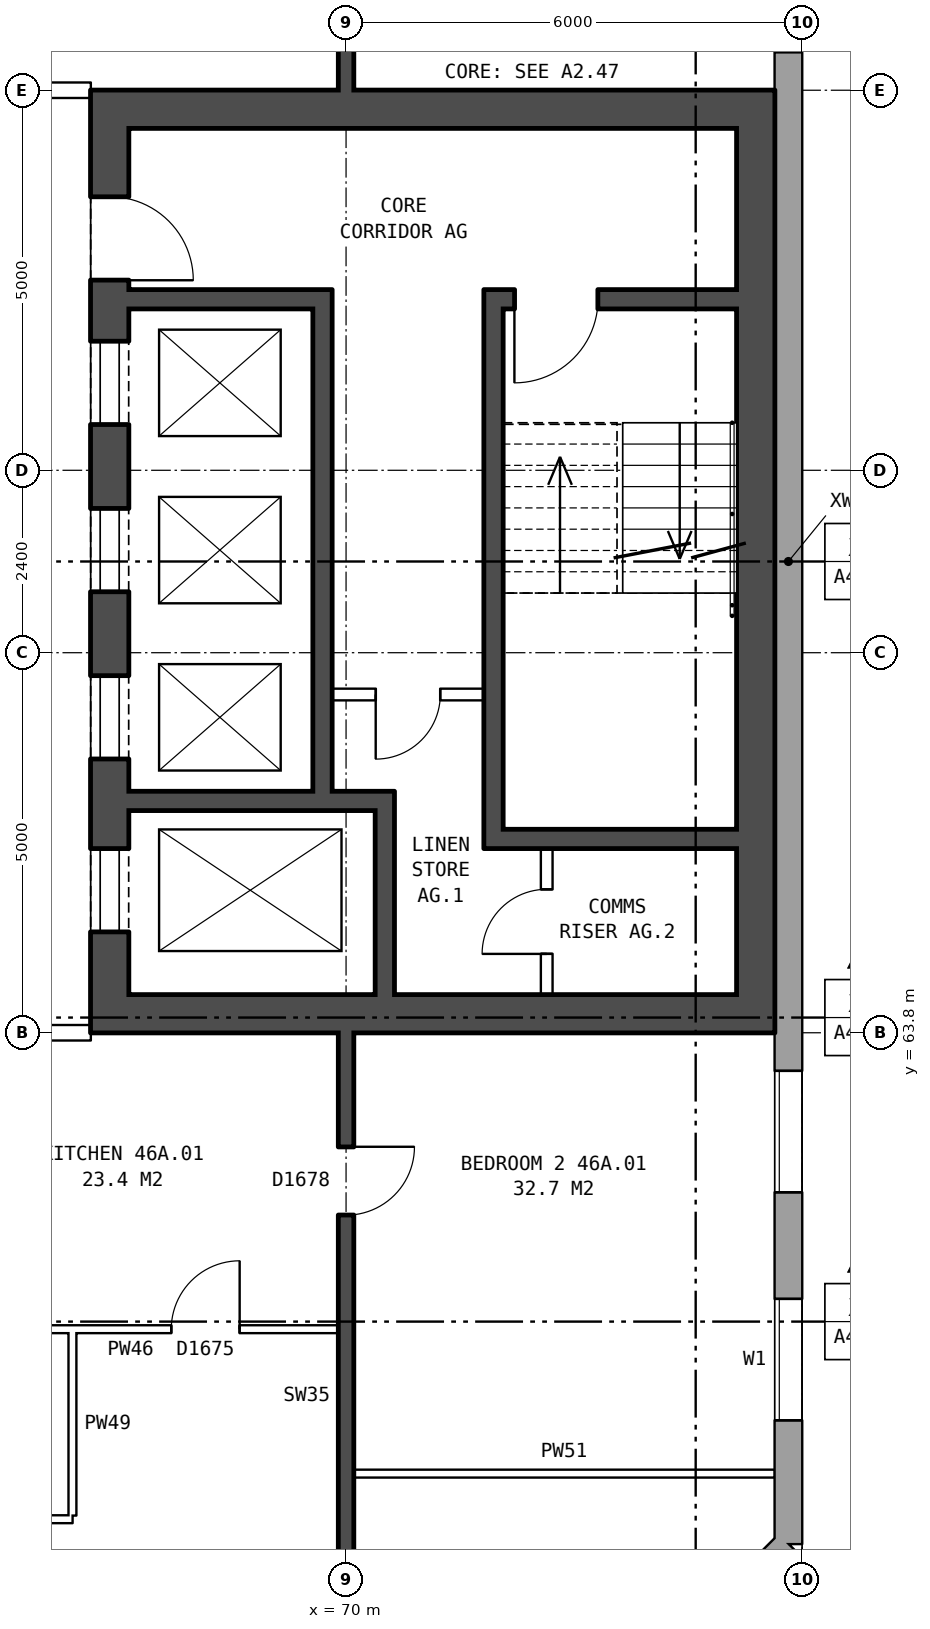
"""IFC4 building model, lengths in metres.
Left out: names, types, materials, properties, quantities, classifications, styles, units other than length and angle.
Written with IfcOpenShell. Run it as: python <this file> out.ifc"""

import sys

from ifc_helpers import new_model, si_unit, direction, frame, frame_2d, origin, place, context, subcontext, project, spatial, rectangle, extrude, element, fill, save


model = new_model("IFC4")
c1 = context("Model", 3, precision=1e-05, world=origin(), true_north=direction((0.0, 1.0)))
c2 = subcontext(c1, "Body", "Model", "MODEL_VIEW")
j1 = project(units=[si_unit("LENGTHUNIT", "METRE"), si_unit("PLANEANGLEUNIT", "RADIAN")], contexts=[c1])
p1 = place(None, origin())
s1 = spatial("IfcSite", under=j1, at=p1, CompositionType="ELEMENT")
p2 = place(p1, origin())
s2 = spatial("IfcBuilding", under=s1, at=p2, CompositionType="ELEMENT")
p3 = place(p2, frame((0.0, 0.0, 164.0)))
s3 = spatial("IfcBuildingStorey", under=s2, at=p3, CompositionType="ELEMENT", Elevation=164.0)
p4 = place(p3, frame((72.925, 54.18, 0.0), z_axis=(0.0, 0.0, 1.0), x_axis=(0.707106781187, 0.707106781187, 0.0)))
e1 = element("IfcWall", 1, at=p4, inside=s3, PredefinedType="STANDARD", context=c2, shape_type="SweptSolid", body=[
    extrude(rectangle(XDim=4.094, YDim=0.36, at=frame_2d((2.047, 0.0))), origin(), (0.0, 0.0, 1.0), 2.85),
])
p5 = place(p4, frame((1.247, 0.0, 0.8)))
e2 = element("IfcOpeningElement", 2, at=p5, cuts=e1, PredefinedType="OPENING", context=c2, shape_type="SweptSolid", body=[
    extrude(rectangle(XDim=1.6, YDim=1.8, at=frame_2d((0.8, 0.9))), frame((0.0, 0.19, 0.0), z_axis=(0.0, -1.0, 0.0), x_axis=(1.0, 0.0, 0.0)), (0.0, 0.0, 1.0), 0.38),
])
p6 = place(p3, frame((75.82, 57.075, 0.0), z_axis=(0.0, 0.0, 1.0), x_axis=(0.0, 1.0, 0.0)))
e3 = element("IfcWall", 3, at=p6, inside=s3, PredefinedType="STANDARD", context=c2, shape_type="SweptSolid", body=[
    extrude(rectangle(XDim=25.851, YDim=0.36, at=frame_2d((12.925, 0.0))), origin(), (0.0, 0.0, 1.0), 2.85),
])
p7 = place(p6, frame((1.625, 0.0, 0.8)))
e4 = element("IfcOpeningElement", 4, at=p7, cuts=e3, PredefinedType="OPENING", context=c2, shape_type="SweptSolid", body=[
    extrude(rectangle(XDim=1.6, YDim=1.8, at=frame_2d((0.8, 0.9))), frame((0.0, 0.19, 0.0), z_axis=(0.0, -1.0, 0.0), x_axis=(1.0, 0.0, 0.0)), (0.0, 0.0, 1.0), 0.38),
])
p8 = place(p6, frame((4.625, 0.0, 0.8)))
e5 = element("IfcOpeningElement", 5, at=p8, cuts=e3, PredefinedType="OPENING", context=c2, shape_type="SweptSolid", body=[
    extrude(rectangle(XDim=1.6, YDim=1.8, at=frame_2d((0.8, 0.9))), frame((0.0, 0.19, 0.0), z_axis=(0.0, -1.0, 0.0), x_axis=(1.0, 0.0, 0.0)), (0.0, 0.0, 1.0), 0.38),
])
p9 = place(p6, frame((19.625, 0.0, 0.8)))
e6 = element("IfcOpeningElement", 6, at=p9, cuts=e3, PredefinedType="OPENING", context=c2, shape_type="SweptSolid", body=[
    extrude(rectangle(XDim=1.6, YDim=1.8, at=frame_2d((0.8, 0.9))), frame((0.0, 0.19, 0.0), z_axis=(0.0, -1.0, 0.0), x_axis=(1.0, 0.0, 0.0)), (0.0, 0.0, 1.0), 0.38),
])
p10 = place(p6, frame((22.625, 0.0, 0.8)))
e7 = element("IfcOpeningElement", 7, at=p10, cuts=e3, PredefinedType="OPENING", context=c2, shape_type="SweptSolid", body=[
    extrude(rectangle(XDim=1.6, YDim=1.8, at=frame_2d((0.8, 0.9))), frame((0.0, 0.19, 0.0), z_axis=(0.0, -1.0, 0.0), x_axis=(1.0, 0.0, 0.0)), (0.0, 0.0, 1.0), 0.38),
])
p11 = place(p3, frame((66.89, 63.8, 0.0), z_axis=(0.0, 0.0, 1.0), x_axis=(0.0, 1.0, 0.0)))
e8 = element("IfcWall", 8, at=p11, inside=s3, PredefinedType="SHEAR", context=c2, shape_type="SweptSolid", body=[
    extrude(rectangle(XDim=12.4, YDim=0.5, at=frame_2d((6.2, 0.0))), origin(), (0.0, 0.0, 1.0), 2.85),
])
p12 = place(p11, frame((1.325, 0.0, 0.0)))
e9 = element("IfcOpeningElement", 9, at=p12, cuts=e8, PredefinedType="OPENING", context=c2, shape_type="SweptSolid", body=[
    extrude(rectangle(XDim=1.1, YDim=2.1, at=frame_2d((0.55, 1.05))), frame((0.0, 0.26, 0.0), z_axis=(0.0, -1.0, 0.0), x_axis=(1.0, 0.0, 0.0)), (0.0, 0.0, 1.0), 0.52),
])
p13 = place(p11, frame((3.6, 0.0, 0.0)))
e10 = element("IfcOpeningElement", 10, at=p13, cuts=e8, PredefinedType="OPENING", context=c2, shape_type="SweptSolid", body=[
    extrude(rectangle(XDim=1.1, YDim=2.1, at=frame_2d((0.55, 1.05))), frame((0.0, 0.26, 0.0), z_axis=(0.0, -1.0, 0.0), x_axis=(1.0, 0.0, 0.0)), (0.0, 0.0, 1.0), 0.52),
])
p14 = place(p11, frame((5.8, 0.0, 0.0)))
e11 = element("IfcOpeningElement", 11, at=p14, cuts=e8, PredefinedType="OPENING", context=c2, shape_type="SweptSolid", body=[
    extrude(rectangle(XDim=1.1, YDim=2.1, at=frame_2d((0.55, 1.05))), frame((0.0, 0.26, 0.0), z_axis=(0.0, -1.0, 0.0), x_axis=(1.0, 0.0, 0.0)), (0.0, 0.0, 1.0), 0.52),
])
p15 = place(p11, frame((8.0, 0.0, 0.0)))
e12 = element("IfcOpeningElement", 12, at=p15, cuts=e8, PredefinedType="OPENING", context=c2, shape_type="SweptSolid", body=[
    extrude(rectangle(XDim=1.1, YDim=2.1, at=frame_2d((0.55, 1.05))), frame((0.0, 0.26, 0.0), z_axis=(0.0, -1.0, 0.0), x_axis=(1.0, 0.0, 0.0)), (0.0, 0.0, 1.0), 0.52),
])
p16 = place(p11, frame((9.9, 0.0, 0.0)))
e13 = element("IfcOpeningElement", 13, at=p16, cuts=e8, PredefinedType="OPENING", context=c2, shape_type="SweptSolid", body=[
    extrude(rectangle(XDim=1.1, YDim=2.1, at=frame_2d((0.55, 1.05))), frame((0.0, 0.26, 0.0), z_axis=(0.0, -1.0, 0.0), x_axis=(1.0, 0.0, 0.0)), (0.0, 0.0, 1.0), 0.52),
])
p17 = place(p3, frame((75.39, 63.8, 0.0), z_axis=(0.0, 0.0, 1.0), x_axis=(0.0, 1.0, 0.0)))
e14 = element("IfcWall", 14, at=p17, inside=s3, PredefinedType="SHEAR", context=c2, shape_type="SweptSolid", body=[
    extrude(rectangle(XDim=12.4, YDim=0.5, at=frame_2d((6.2, 0.0))), origin(), (0.0, 0.0, 1.0), 2.85),
])
for number, where, z_axis, x_axis in (
    (15, (67.14, 64.05, 0.0), (0.0, 0.0, 1.0), (1.0, 0.0, 0.0)),
    (16, (67.14, 75.95, 0.0), (0.0, 0.0, 1.0), (1.0, 0.0, 0.0)),
):
    element("IfcWall", number, at=place(p3, frame(where, z_axis=z_axis, x_axis=x_axis)), inside=s3, PredefinedType="SHEAR", context=c2, shape_type="SweptSolid", body=[
        extrude(rectangle(XDim=8.0, YDim=0.5, at=frame_2d((4.0, 0.0))), origin(), (0.0, 0.0, 1.0), 2.85),
    ])
p18 = place(p3, frame((72.065, 66.35, 0.0), z_axis=(0.0, 0.0, 1.0), x_axis=(1.0, 0.0, 0.0)))
e17 = element("IfcWall", 17, at=p18, inside=s3, PredefinedType="SHEAR", context=c2, shape_type="SweptSolid", body=[
    extrude(rectangle(XDim=3.075, YDim=0.25, at=frame_2d((1.538, 0.0))), origin(), (0.0, 0.0, 1.0), 2.85),
])
p19 = place(p3, frame((67.14, 66.85, 0.0), z_axis=(0.0, 0.0, 1.0), x_axis=(1.0, 0.0, 0.0)))
e18 = element("IfcWall", 18, at=p19, inside=s3, PredefinedType="SHEAR", context=c2, shape_type="SweptSolid", body=[
    extrude(rectangle(XDim=3.495, YDim=0.25, at=frame_2d((1.748, 0.0))), origin(), (0.0, 0.0, 1.0), 2.85),
])
p20 = place(p3, frame((69.815, 68.25, 0.0), z_axis=(0.0, 0.0, 1.0), x_axis=(1.0, 0.0, 0.0)))
e19 = element("IfcWall", 19, at=p20, inside=s3, PredefinedType="PARTITIONING", context=c2, shape_type="SweptSolid", body=[
    extrude(rectangle(XDim=2.0, YDim=0.15, at=frame_2d((1.0, 0.0))), origin(), (0.0, 0.0, 1.0), 2.85),
])
p21 = place(p20, frame((0.575, 0.0, 0.0)))
e20 = element("IfcOpeningElement", 20, at=p21, cuts=e19, PredefinedType="OPENING", context=c2, shape_type="SweptSolid", body=[
    extrude(rectangle(XDim=0.85, YDim=2.1, at=frame_2d((0.425, 1.05))), frame((0.0, 0.085, 0.0), z_axis=(0.0, -1.0, 0.0), x_axis=(1.0, 0.0, 0.0)), (0.0, 0.0, 1.0), 0.17),
])
p22 = place(p3, frame((67.14, 73.45, 0.0), z_axis=(0.0, 0.0, 1.0), x_axis=(1.0, 0.0, 0.0)))
e21 = element("IfcWall", 21, at=p22, inside=s3, PredefinedType="SHEAR", context=c2, shape_type="SweptSolid", body=[
    extrude(rectangle(XDim=2.425, YDim=0.25, at=frame_2d((1.212, 0.0))), origin(), (0.0, 0.0, 1.0), 2.85),
])
p23 = place(p3, frame((72.065, 73.45, 0.0), z_axis=(0.0, 0.0, 1.0), x_axis=(1.0, 0.0, 0.0)))
e22 = element("IfcWall", 22, at=p23, inside=s3, PredefinedType="SHEAR", context=c2, shape_type="SweptSolid", body=[
    extrude(rectangle(XDim=3.075, YDim=0.25, at=frame_2d((1.538, 0.0))), origin(), (0.0, 0.0, 1.0), 2.85),
])
p24 = place(p23, frame((0.15, 0.0, 0.0)))
e23 = element("IfcOpeningElement", 23, at=p24, cuts=e22, PredefinedType="OPENING", context=c2, shape_type="SweptSolid", body=[
    extrude(rectangle(XDim=1.1, YDim=2.1, at=frame_2d((0.55, 1.05))), frame((0.0, 0.135, 0.0), z_axis=(0.0, -1.0, 0.0), x_axis=(1.0, 0.0, 0.0)), (0.0, 0.0, 1.0), 0.27),
])
p25 = place(p3, frame((69.69, 66.975, 0.0), z_axis=(0.0, 0.0, 1.0), x_axis=(0.0, 1.0, 0.0)))
e24 = element("IfcWall", 24, at=p25, inside=s3, PredefinedType="SHEAR", context=c2, shape_type="SweptSolid", body=[
    extrude(rectangle(XDim=6.6, YDim=0.25, at=frame_2d((3.3, 0.0))), origin(), (0.0, 0.0, 1.0), 2.85),
])
p26 = place(p3, frame((70.51, 64.3, 0.0), z_axis=(0.0, 0.0, 1.0), x_axis=(0.0, 1.0, 0.0)))
e25 = element("IfcWall", 25, at=p26, inside=s3, PredefinedType="SHEAR", context=c2, shape_type="SweptSolid", body=[
    extrude(rectangle(XDim=2.425, YDim=0.25, at=frame_2d((1.212, 0.0))), origin(), (0.0, 0.0, 1.0), 2.85),
])
p27 = place(p3, frame((71.94, 66.225, 0.0), z_axis=(0.0, 0.0, 1.0), x_axis=(0.0, 1.0, 0.0)))
e26 = element("IfcWall", 26, at=p27, inside=s3, PredefinedType="SHEAR", context=c2, shape_type="SweptSolid", body=[
    extrude(rectangle(XDim=7.35, YDim=0.25, at=frame_2d((3.675, 0.0))), origin(), (0.0, 0.0, 1.0), 2.85),
])
p28 = place(p3, frame((72.64, 64.3, 0.0), z_axis=(0.0, 0.0, 1.0), x_axis=(0.0, 1.0, 0.0)))
e27 = element("IfcWall", 27, at=p28, inside=s3, PredefinedType="PARTITIONING", context=c2, shape_type="SweptSolid", body=[
    extrude(rectangle(XDim=1.925, YDim=0.15, at=frame_2d((0.962, 0.0))), origin(), (0.0, 0.0, 1.0), 2.85),
])
p29 = place(p28, frame((0.538, 0.0, 0.0)))
e28 = element("IfcOpeningElement", 28, at=p29, cuts=e27, PredefinedType="OPENING", context=c2, shape_type="SweptSolid", body=[
    extrude(rectangle(XDim=0.85, YDim=2.1, at=frame_2d((0.425, 1.05))), frame((0.0, 0.085, 0.0), z_axis=(0.0, -1.0, 0.0), x_axis=(1.0, 0.0, 0.0)), (0.0, 0.0, 1.0), 0.17),
])
p30 = place(p3, frame((64.1, 57.4, 0.0), z_axis=(0.0, 0.0, 1.0), x_axis=(1.0, 0.0, 0.0)))
e29 = element("IfcWall", 29, at=p30, inside=s3, PredefinedType="PARTITIONING", context=c2, shape_type="SweptSolid", body=[
    extrude(rectangle(XDim=2.3, YDim=0.1, at=frame_2d((1.15, 0.0))), origin(), (0.0, 0.0, 1.0), 2.85),
])
p31 = place(p3, frame((70.1, 58.0, 0.0), z_axis=(0.0, 0.0, 1.0), x_axis=(1.0, 0.0, 0.0)))
e30 = element("IfcWall", 30, at=p31, inside=s3, PredefinedType="PARTITIONING", context=c2, shape_type="SweptSolid", body=[
    extrude(rectangle(XDim=5.54, YDim=0.1, at=frame_2d((2.77, 0.0))), origin(), (0.0, 0.0, 1.0), 2.85),
])
p32 = place(p3, frame((64.1, 59.9, 0.0), z_axis=(0.0, 0.0, 1.0), x_axis=(1.0, 0.0, 0.0)))
e31 = element("IfcWall", 31, at=p32, inside=s3, PredefinedType="PARTITIONING", context=c2, shape_type="SweptSolid", body=[
    extrude(rectangle(XDim=5.8, YDim=0.1, at=frame_2d((2.9, 0.0))), origin(), (0.0, 0.0, 1.0), 2.85),
])
p33 = place(p32, frame((3.6, 0.0, 0.0)))
e32 = element("IfcOpeningElement", 32, at=p33, cuts=e31, PredefinedType="OPENING", context=c2, shape_type="SweptSolid", body=[
    extrude(rectangle(XDim=0.9, YDim=2.1, at=frame_2d((0.45, 1.05))), frame((0.0, 0.06, 0.0), z_axis=(0.0, -1.0, 0.0), x_axis=(1.0, 0.0, 0.0)), (0.0, 0.0, 1.0), 0.12),
])
p34 = place(p32, frame((0.7, 0.0, 0.0)))
e33 = element("IfcOpeningElement", 33, at=p34, cuts=e31, PredefinedType="OPENING", context=c2, shape_type="SweptSolid", body=[
    extrude(rectangle(XDim=0.9, YDim=2.1, at=frame_2d((0.45, 1.05))), frame((0.0, 0.06, 0.0), z_axis=(0.0, -1.0, 0.0), x_axis=(1.0, 0.0, 0.0)), (0.0, 0.0, 1.0), 0.12),
])
p35 = place(p3, frame((63.64, 63.8, 0.0), z_axis=(0.0, 0.0, 1.0), x_axis=(1.0, 0.0, 0.0)))
e34 = element("IfcWall", 34, at=p35, inside=s3, PredefinedType="PARTITIONING", context=c2, shape_type="SweptSolid", body=[
    extrude(rectangle(XDim=3.0, YDim=0.2, at=frame_2d((1.5, 0.0))), origin(), (0.0, 0.0, 1.0), 2.85),
])
p36 = place(p35, frame((1.18, 0.0, 0.0)))
e35 = element("IfcOpeningElement", 35, at=p36, cuts=e34, PredefinedType="OPENING", context=c2, shape_type="SweptSolid", body=[
    extrude(rectangle(XDim=1.0, YDim=2.1, at=frame_2d((0.5, 1.05))), frame((0.0, 0.11, 0.0), z_axis=(0.0, -1.0, 0.0), x_axis=(1.0, 0.0, 0.0)), (0.0, 0.0, 1.0), 0.22),
])
p37 = place(p3, frame((63.64, 76.2, 0.0), z_axis=(0.0, 0.0, 1.0), x_axis=(1.0, 0.0, 0.0)))
e36 = element("IfcWall", 36, at=p37, inside=s3, PredefinedType="PARTITIONING", context=c2, shape_type="SweptSolid", body=[
    extrude(rectangle(XDim=3.0, YDim=0.2, at=frame_2d((1.5, 0.0))), origin(), (0.0, 0.0, 1.0), 2.85),
])
p38 = place(p37, frame((1.18, 0.0, 0.0)))
e37 = element("IfcOpeningElement", 37, at=p38, cuts=e36, PredefinedType="OPENING", context=c2, shape_type="SweptSolid", body=[
    extrude(rectangle(XDim=1.0, YDim=2.1, at=frame_2d((0.5, 1.05))), frame((0.0, 0.11, 0.0), z_axis=(0.0, -1.0, 0.0), x_axis=(1.0, 0.0, 0.0)), (0.0, 0.0, 1.0), 0.22),
])
p39 = place(p3, frame((66.4, 57.45, 0.0), z_axis=(0.0, 0.0, 1.0), x_axis=(0.0, 1.0, 0.0)))
e38 = element("IfcWall", 38, at=p39, inside=s3, PredefinedType="PARTITIONING", context=c2, shape_type="SweptSolid", body=[
    extrude(rectangle(XDim=2.4, YDim=0.1, at=frame_2d((1.2, 0.0))), origin(), (0.0, 0.0, 1.0), 2.85),
])
p40 = place(p3, frame((70.0, 54.36, 0.0), z_axis=(0.0, 0.0, 1.0), x_axis=(0.0, 1.0, 0.0)))
e39 = element("IfcWall", 39, at=p40, inside=s3, PredefinedType="SOLIDWALL", context=c2, shape_type="SweptSolid", body=[
    extrude(rectangle(XDim=9.44, YDim=0.2, at=frame_2d((4.72, 0.0))), origin(), (0.0, 0.0, 1.0), 2.85),
])
p41 = place(p40, frame((1.37, 0.0, 0.0)))
e40 = element("IfcOpeningElement", 40, at=p41, cuts=e39, PredefinedType="OPENING", context=c2, shape_type="SweptSolid", body=[
    extrude(rectangle(XDim=0.9, YDim=2.1, at=frame_2d((0.45, 1.05))), frame((0.0, 0.11, 0.0), z_axis=(0.0, -1.0, 0.0), x_axis=(1.0, 0.0, 0.0)), (0.0, 0.0, 1.0), 0.22),
])
p42 = place(p40, frame((7.04, 0.0, 0.0)))
e41 = element("IfcOpeningElement", 41, at=p42, cuts=e39, PredefinedType="OPENING", context=c2, shape_type="SweptSolid", body=[
    extrude(rectangle(XDim=0.9, YDim=2.1, at=frame_2d((0.45, 1.05))), frame((0.0, 0.11, 0.0), z_axis=(0.0, -1.0, 0.0), x_axis=(1.0, 0.0, 0.0)), (0.0, 0.0, 1.0), 0.22),
])
p43 = place(p3, frame((70.0, 76.2, 0.0), z_axis=(0.0, 0.0, 1.0), x_axis=(0.0, 1.0, 0.0)))
e42 = element("IfcWall", 42, at=p43, inside=s3, PredefinedType="SOLIDWALL", context=c2, shape_type="SweptSolid", body=[
    extrude(rectangle(XDim=9.44, YDim=0.2, at=frame_2d((4.72, 0.0))), origin(), (0.0, 0.0, 1.0), 2.85),
])
p44 = place(p43, frame((1.5, 0.0, 0.0)))
e43 = element("IfcOpeningElement", 43, at=p44, cuts=e42, PredefinedType="OPENING", context=c2, shape_type="SweptSolid", body=[
    extrude(rectangle(XDim=0.9, YDim=2.1, at=frame_2d((0.45, 1.05))), frame((0.0, 0.11, 0.0), z_axis=(0.0, -1.0, 0.0), x_axis=(1.0, 0.0, 0.0)), (0.0, 0.0, 1.0), 0.22),
])
p45 = place(p7, origin())
e44 = element("IfcWindow", 44, at=p45, inside=s3, PartitioningType="SINGLE_PANEL", PredefinedType="WINDOW", context=c2, shape_type="SweptSolid", body=[
    extrude(rectangle(XDim=1.6, YDim=1.8, at=frame_2d((0.8, 0.9))), frame((0.0, 0.15, 0.0), z_axis=(0.0, -1.0, 0.0), x_axis=(1.0, 0.0, 0.0)), (0.0, 0.0, 1.0), 0.06),
])
fill(e4, e44)
p46 = place(p8, origin())
e45 = element("IfcWindow", 45, at=p46, inside=s3, PartitioningType="SINGLE_PANEL", PredefinedType="WINDOW", context=c2, shape_type="SweptSolid", body=[
    extrude(rectangle(XDim=1.6, YDim=1.8, at=frame_2d((0.8, 0.9))), frame((0.0, 0.15, 0.0), z_axis=(0.0, -1.0, 0.0), x_axis=(1.0, 0.0, 0.0)), (0.0, 0.0, 1.0), 0.06),
])
fill(e5, e45)
p47 = place(p12, origin())
e46 = element("IfcDoor", 46, at=p47, inside=s3, OperationType="DOUBLE_DOOR_SLIDING", PredefinedType="DOOR", context=c2, shape_type="SweptSolid", body=[
    extrude(rectangle(XDim=1.1, YDim=2.1, at=frame_2d((0.55, 1.05))), frame((0.0, -0.185, 0.0), z_axis=(0.0, -1.0, 0.0), x_axis=(1.0, 0.0, 0.0)), (0.0, 0.0, 1.0), 0.05),
])
fill(e9, e46)
p48 = place(p13, origin())
e47 = element("IfcDoor", 47, at=p48, inside=s3, OperationType="DOUBLE_DOOR_SLIDING", PredefinedType="DOOR", context=c2, shape_type="SweptSolid", body=[
    extrude(rectangle(XDim=1.1, YDim=2.1, at=frame_2d((0.55, 1.05))), frame((0.0, -0.185, 0.0), z_axis=(0.0, -1.0, 0.0), x_axis=(1.0, 0.0, 0.0)), (0.0, 0.0, 1.0), 0.05),
])
fill(e10, e47)
p49 = place(p14, origin())
e48 = element("IfcDoor", 48, at=p49, inside=s3, OperationType="DOUBLE_DOOR_SLIDING", PredefinedType="DOOR", context=c2, shape_type="SweptSolid", body=[
    extrude(rectangle(XDim=1.1, YDim=2.1, at=frame_2d((0.55, 1.05))), frame((0.0, -0.185, 0.0), z_axis=(0.0, -1.0, 0.0), x_axis=(1.0, 0.0, 0.0)), (0.0, 0.0, 1.0), 0.05),
])
fill(e11, e48)
p50 = place(p15, origin())
e49 = element("IfcDoor", 49, at=p50, inside=s3, OperationType="DOUBLE_DOOR_SLIDING", PredefinedType="DOOR", context=c2, shape_type="SweptSolid", body=[
    extrude(rectangle(XDim=1.1, YDim=2.1, at=frame_2d((0.55, 1.05))), frame((0.0, -0.185, 0.0), z_axis=(0.0, -1.0, 0.0), x_axis=(1.0, 0.0, 0.0)), (0.0, 0.0, 1.0), 0.05),
])
fill(e12, e49)
p51 = place(p16, frame((1.1, 0.0, 0.0), z_axis=(0.0, 0.0, 1.0), x_axis=(-1.0, 0.0, 0.0)))
e50 = element("IfcDoor", 50, at=p51, inside=s3, OperationType="SINGLE_SWING_RIGHT", PredefinedType="DOOR", context=c2, shape_type="SweptSolid", body=[
    extrude(rectangle(XDim=1.1, YDim=2.1, at=frame_2d((0.55, 1.05))), frame((0.0, 0.235, 0.0), z_axis=(0.0, -1.0, 0.0), x_axis=(1.0, 0.0, 0.0)), (0.0, 0.0, 1.0), 0.05),
])
fill(e13, e50)
p52 = place(p24, frame((1.1, 0.0, 0.0), z_axis=(0.0, 0.0, 1.0), x_axis=(-1.0, 0.0, 0.0)))
e51 = element("IfcDoor", 51, at=p52, inside=s3, OperationType="SINGLE_SWING_RIGHT", PredefinedType="DOOR", context=c2, shape_type="SweptSolid", body=[
    extrude(rectangle(XDim=1.1, YDim=2.1, at=frame_2d((0.55, 1.05))), frame((0.0, 0.025, 0.0), z_axis=(0.0, -1.0, 0.0), x_axis=(1.0, 0.0, 0.0)), (0.0, 0.0, 1.0), 0.05),
])
fill(e23, e51)
p53 = place(p21, frame((0.85, 0.0, 0.0), z_axis=(0.0, 0.0, 1.0), x_axis=(-1.0, 0.0, 0.0)))
e52 = element("IfcDoor", 52, at=p53, inside=s3, OperationType="SINGLE_SWING_RIGHT", PredefinedType="DOOR", context=c2, shape_type="SweptSolid", body=[
    extrude(rectangle(XDim=0.85, YDim=2.1, at=frame_2d((0.425, 1.05))), frame((0.0, 0.025, 0.0), z_axis=(0.0, -1.0, 0.0), x_axis=(1.0, 0.0, 0.0)), (0.0, 0.0, 1.0), 0.05),
])
fill(e20, e52)
p54 = place(p29, origin())
e53 = element("IfcDoor", 53, at=p54, inside=s3, OperationType="SINGLE_SWING_LEFT", PredefinedType="DOOR", context=c2, shape_type="SweptSolid", body=[
    extrude(rectangle(XDim=0.85, YDim=2.1, at=frame_2d((0.425, 1.05))), frame((0.0, 0.025, 0.0), z_axis=(0.0, -1.0, 0.0), x_axis=(1.0, 0.0, 0.0)), (0.0, 0.0, 1.0), 0.05),
])
fill(e28, e53)
p55 = place(p42, frame((0.9, 0.0, 0.0), z_axis=(0.0, 0.0, 1.0), x_axis=(-1.0, 0.0, 0.0)))
e54 = element("IfcDoor", 54, at=p55, inside=s3, OperationType="SINGLE_SWING_LEFT", PredefinedType="DOOR", context=c2, shape_type="SweptSolid", body=[
    extrude(rectangle(XDim=0.9, YDim=2.1, at=frame_2d((0.45, 1.05))), frame((0.0, 0.025, 0.0), z_axis=(0.0, -1.0, 0.0), x_axis=(1.0, 0.0, 0.0)), (0.0, 0.0, 1.0), 0.05),
])
fill(e41, e54)
p56 = place(p33, origin())
e55 = element("IfcDoor", 55, at=p56, inside=s3, OperationType="SINGLE_SWING_RIGHT", PredefinedType="DOOR", context=c2, shape_type="SweptSolid", body=[
    extrude(rectangle(XDim=0.9, YDim=2.1, at=frame_2d((0.45, 1.05))), frame((0.0, 0.025, 0.0), z_axis=(0.0, -1.0, 0.0), x_axis=(1.0, 0.0, 0.0)), (0.0, 0.0, 1.0), 0.05),
])
fill(e32, e55)
save(model, sys.argv[1])
